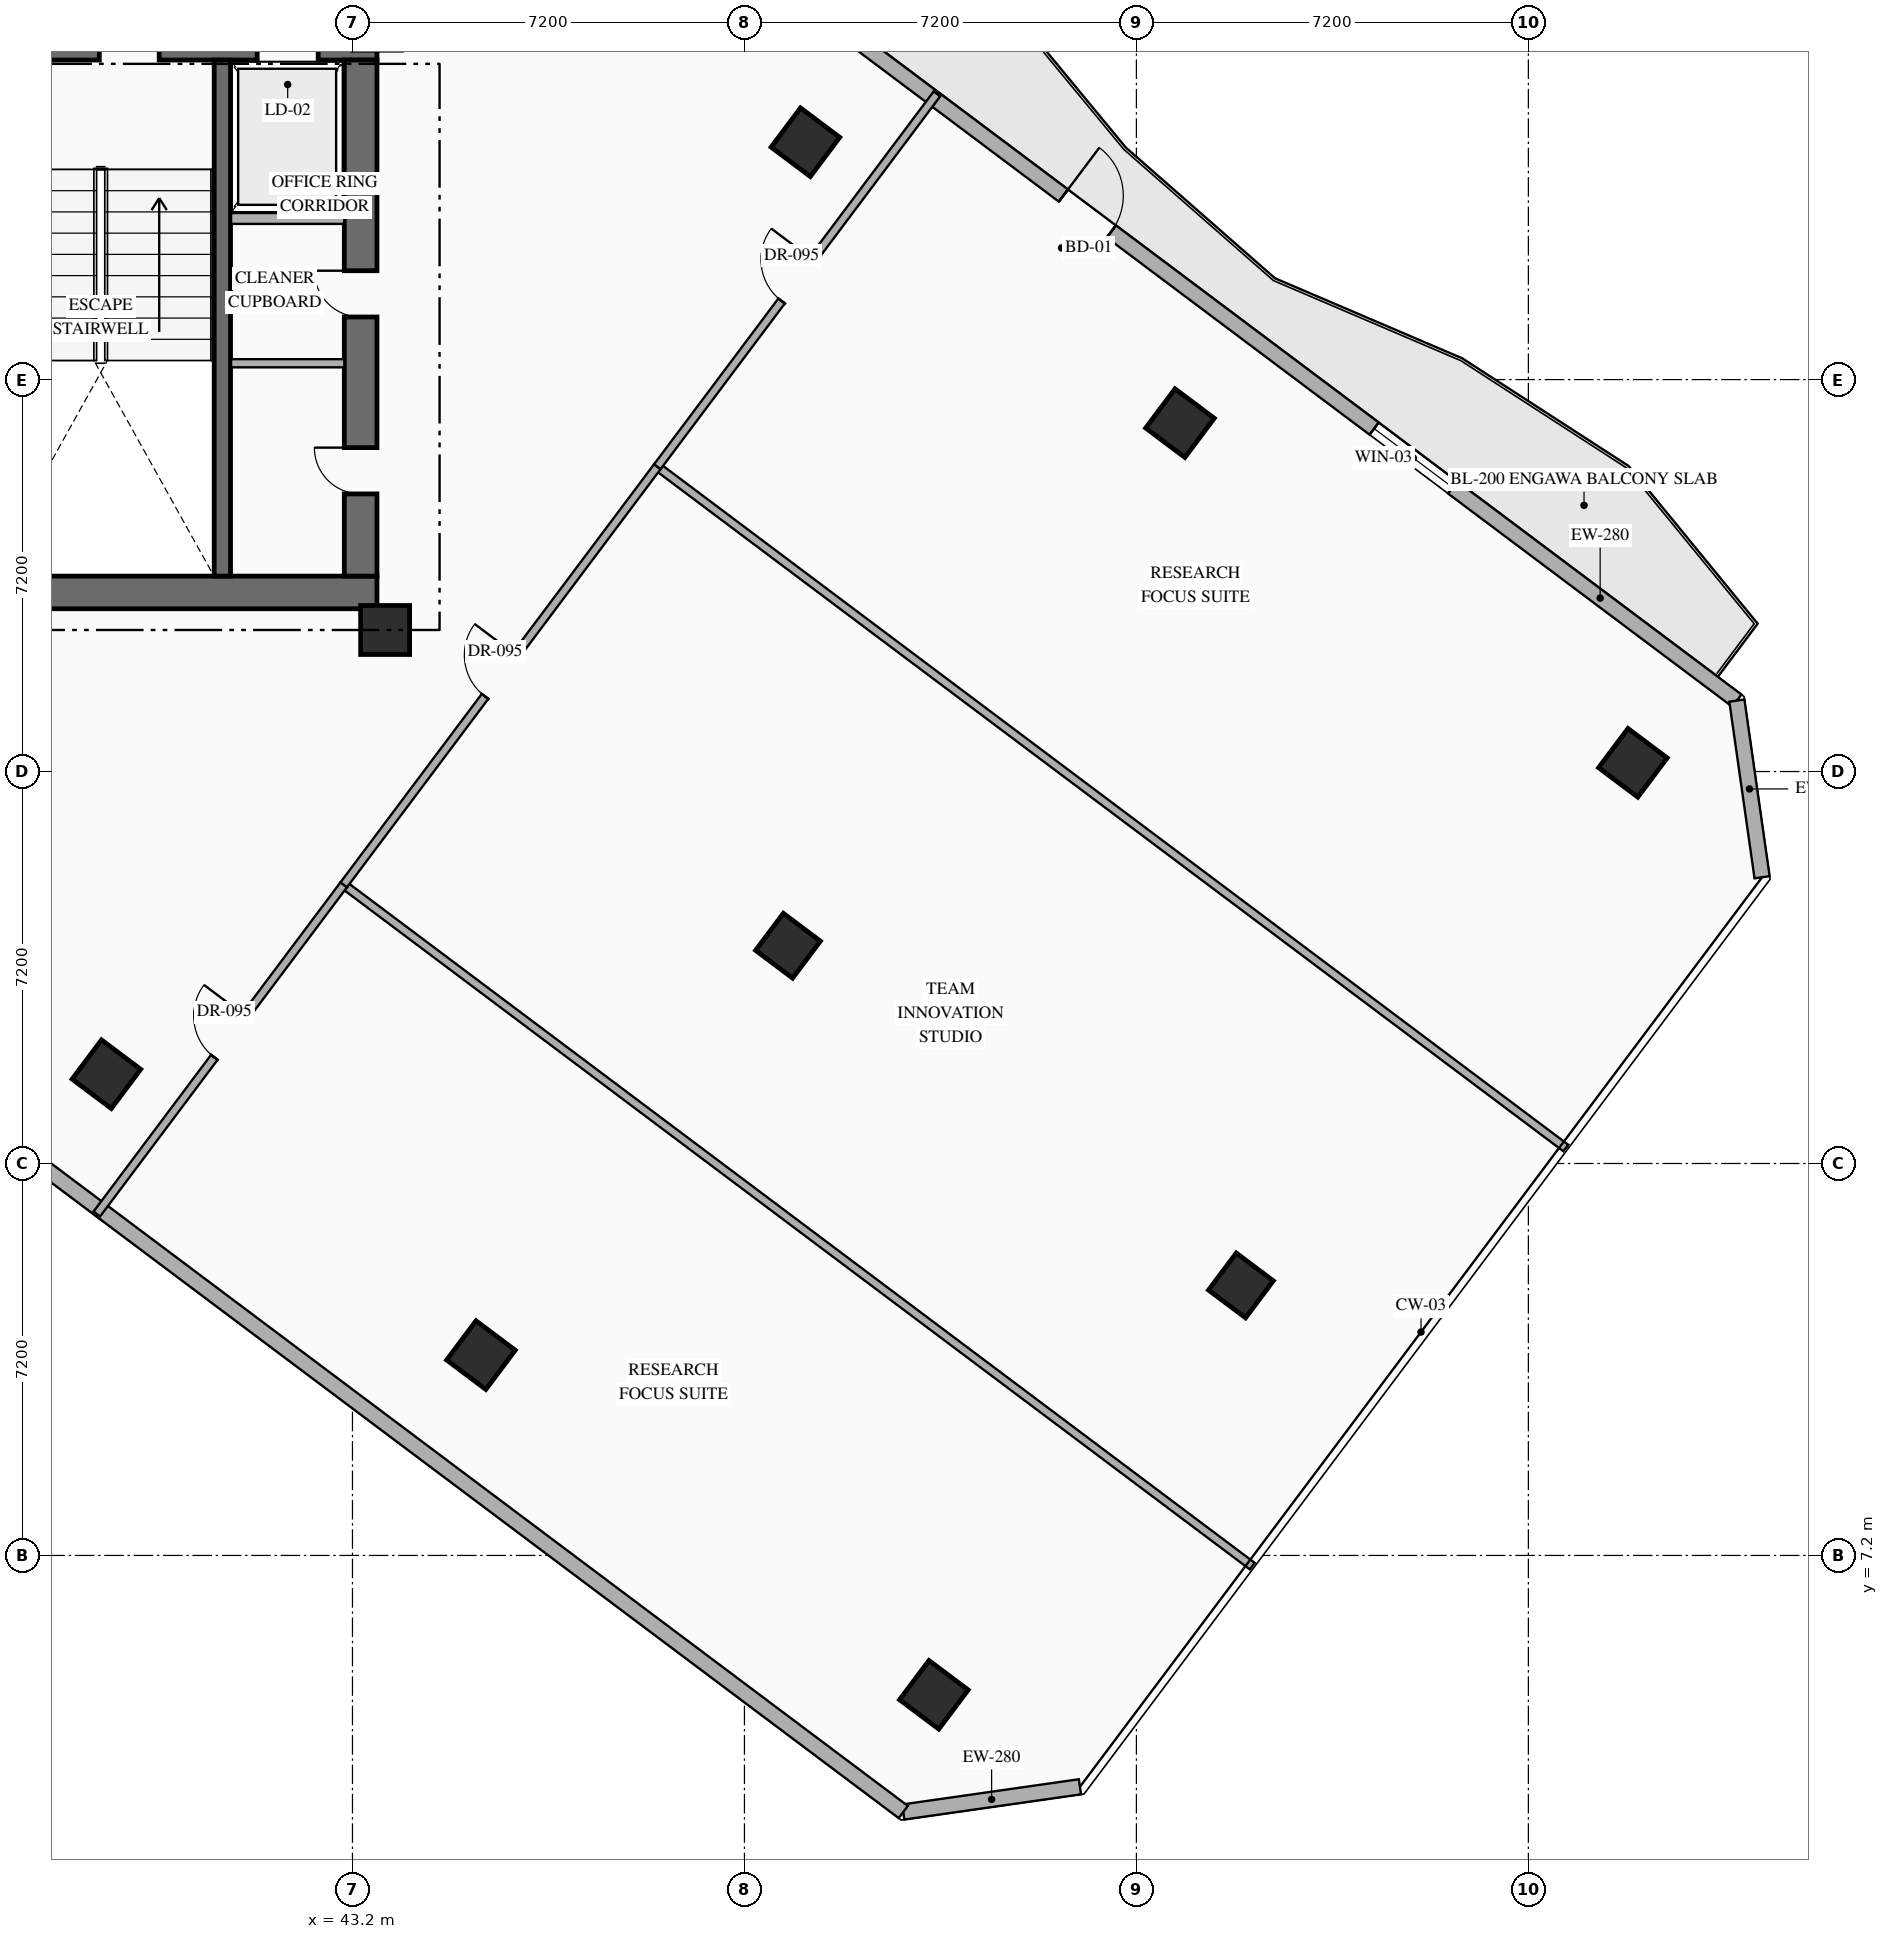
"""IFC4 building model, lengths in metres.
Left out: names, types, materials, properties, quantities, classifications, styles, units other than length and angle.
Written with IfcOpenShell. Run it as: python <this file> out.ifc"""

import sys

from ifc_helpers import new_model, si_unit, direction, frame, frame_2d, origin, origin_2d, place, context, subcontext, project, spatial, rectangle, hollow_rectangle, extrude, element, fill, save


model = new_model("IFC4")
c1 = context("Model", 3, precision=1e-05, world=origin(), true_north=direction((0.0, 1.0)))
c2 = subcontext(c1, "Body", "Model", "MODEL_VIEW")
j1 = project(units=[si_unit("LENGTHUNIT", "METRE"), si_unit("PLANEANGLEUNIT", "RADIAN")], contexts=[c1])
p1 = place(None, origin())
s1 = spatial("IfcSite", under=j1, at=p1, CompositionType="ELEMENT")
p2 = place(p1, origin())
s2 = spatial("IfcBuilding", under=s1, at=p2, CompositionType="ELEMENT")
p3 = place(p2, frame((0.0, 0.0, 108.45)))
s3 = spatial("IfcBuildingStorey", under=s2, at=p3, CompositionType="ELEMENT", Elevation=108.45)
p4 = place(p3, frame((35.89, 24.89, 0.0), z_axis=(0.0, 0.0, 1.0), x_axis=(1.0, 0.0, 0.0)))
e1 = element("IfcWall", 1, at=p4, inside=s3, PredefinedType="SHEAR", context=c2, shape_type="SweptSolid", body=[
    extrude(rectangle(XDim=7.76, YDim=0.6, at=frame_2d((3.88, 0.0))), origin(), (0.0, 0.0, 1.0), 3.6),
])
p5 = place(p3, frame((35.89, 34.97, 0.0), z_axis=(0.0, 0.0, 1.0), x_axis=(1.0, 0.0, 0.0)))
e2 = element("IfcWall", 2, at=p5, inside=s3, PredefinedType="SHEAR", context=c2, shape_type="SweptSolid", body=[
    extrude(rectangle(XDim=7.76, YDim=0.6, at=frame_2d((3.88, 0.0))), origin(), (0.0, 0.0, 1.0), 3.6),
])
p6 = place(p5, frame((2.66, 0.0, 0.0)))
e3 = element("IfcOpeningElement", 3, at=p6, cuts=e2, PredefinedType="OPENING", context=c2, shape_type="SweptSolid", body=[
    extrude(rectangle(XDim=1.1, YDim=2.2, at=frame_2d((0.55, 1.1))), frame((0.0, 0.31, 0.0), z_axis=(0.0, -1.0, 0.0), x_axis=(1.0, 0.0, 0.0)), (0.0, 0.0, 1.0), 0.62),
])
p7 = place(p5, frame((5.56, 0.0, 0.0)))
e4 = element("IfcOpeningElement", 4, at=p7, cuts=e2, PredefinedType="OPENING", context=c2, shape_type="SweptSolid", body=[
    extrude(rectangle(XDim=1.12, YDim=2.15, at=frame_2d((0.56, 1.075))), frame((0.0, 0.31, 0.0), z_axis=(0.0, -1.0, 0.0), x_axis=(1.0, 0.0, 0.0)), (0.0, 0.0, 1.0), 0.62),
])
p8 = place(p3, frame((43.35, 25.19, 0.0), z_axis=(0.0, 0.0, 1.0), x_axis=(0.0, 1.0, 0.0)))
e5 = element("IfcWall", 5, at=p8, inside=s3, PredefinedType="SHEAR", context=c2, shape_type="SweptSolid", body=[
    extrude(rectangle(XDim=9.48, YDim=0.6, at=frame_2d((4.74, 0.0))), origin(), (0.0, 0.0, 1.0), 3.6),
])
p9 = place(p8, frame((1.51, 0.0, 0.0)))
e6 = element("IfcOpeningElement", 6, at=p9, cuts=e5, PredefinedType="OPENING", context=c2, shape_type="SweptSolid", body=[
    extrude(rectangle(XDim=0.85, YDim=2.08, at=frame_2d((0.425, 1.04))), frame((0.0, 0.31, 0.0), z_axis=(0.0, -1.0, 0.0), x_axis=(1.0, 0.0, 0.0)), (0.0, 0.0, 1.0), 0.62),
])
p10 = place(p8, frame((4.76, 0.0, 0.0)))
e7 = element("IfcOpeningElement", 7, at=p10, cuts=e5, PredefinedType="OPENING", context=c2, shape_type="SweptSolid", body=[
    extrude(rectangle(XDim=0.85, YDim=2.08, at=frame_2d((0.425, 1.04))), frame((0.0, 0.31, 0.0), z_axis=(0.0, -1.0, 0.0), x_axis=(1.0, 0.0, 0.0)), (0.0, 0.0, 1.0), 0.62),
])
p11 = place(p3, frame((40.81, 25.19, 0.0), z_axis=(0.0, 0.0, 1.0), x_axis=(0.0, 1.0, 0.0)))
e8 = element("IfcWall", 8, at=p11, inside=s3, PredefinedType="SHEAR", context=c2, shape_type="SweptSolid", body=[
    extrude(rectangle(XDim=9.48, YDim=0.3, at=frame_2d((4.74, 0.0))), origin(), (0.0, 0.0, 1.0), 3.6),
])
p12 = place(p3, frame((43.8, 24.2, 0.0), z_axis=(0.0, 0.0, 1.0), x_axis=(1.0, 0.0, 0.0)))
e9 = element("IfcColumn", 9, at=p12, inside=s3, PredefinedType="COLUMN", context=c2, shape_type="SweptSolid", body=[
    extrude(rectangle(XDim=0.9, YDim=0.9, at=origin_2d()), origin(), (0.0, 0.0, 1.0), 3.6),
])
for number, where, z_axis, x_axis in (
    (10, (38.68, 16.04, 0.0), (0.0, 0.0, 1.0), (0.8, -0.6, 0.0)),
    (11, (51.52, 33.16, 0.0), (0.0, 0.0, 1.0), (0.8, -0.6, 0.0)),
    (12, (45.56, 10.88, 0.0), (0.0, 0.0, 1.0), (0.8, -0.6, 0.0)),
    (13, (58.4, 28.0, 0.0), (0.0, 0.0, 1.0), (0.8, -0.6, 0.0)),
):
    element("IfcColumn", number, at=place(p3, frame(where, z_axis=z_axis, x_axis=x_axis)), inside=s3, PredefinedType="COLUMN", context=c2, shape_type="SweptSolid", body=[
        extrude(hollow_rectangle(XDim=0.9, YDim=0.9, WallThickness=0.036, at=origin_2d()), origin(), (0.0, 0.0, 1.0), 3.6),
    ])
p13 = place(p3, frame((51.2, 18.4, 0.0), z_axis=(0.0, 0.0, 1.0), x_axis=(0.799999996291, -0.600000004945, 0.0)))
e14 = element("IfcColumn", 14, at=p13, inside=s3, PredefinedType="COLUMN", context=c2, shape_type="SweptSolid", body=[
    extrude(hollow_rectangle(XDim=0.85, YDim=0.85, WallThickness=0.032, at=origin_2d()), origin(), (0.0, 0.0, 1.0), 3.6),
])
for number, where, z_axis, x_axis in (
    (15, (53.88, 4.64, 0.0), (0.0, 0.0, 1.0), (0.8, -0.6, 0.0)),
    (16, (66.72, 21.76, 0.0), (0.0, 0.0, 1.0), (0.8, -0.6, 0.0)),
):
    element("IfcColumn", number, at=place(p3, frame(where, z_axis=z_axis, x_axis=x_axis)), inside=s3, PredefinedType="COLUMN", context=c2, shape_type="SweptSolid", body=[
        extrude(hollow_rectangle(XDim=0.9, YDim=0.9, WallThickness=0.036, at=origin_2d()), origin(), (0.0, 0.0, 1.0), 3.6),
    ])
p14 = place(p3, frame((59.52, 12.16, 0.0), z_axis=(0.0, 0.0, 1.0), x_axis=(0.799999996291, -0.600000004945, 0.0)))
e17 = element("IfcColumn", 17, at=p14, inside=s3, PredefinedType="COLUMN", context=c2, shape_type="SweptSolid", body=[
    extrude(hollow_rectangle(XDim=0.85, YDim=0.85, WallThickness=0.032, at=origin_2d()), origin(), (0.0, 0.0, 1.0), 3.6),
])
p15 = place(p3, frame((44.86, 40.73, 0.0), z_axis=(0.0, 0.0, 1.0), x_axis=(0.800006902154, -0.599990797017, 0.0)))
e18 = element("IfcWall", 18, at=p15, inside=s3, PredefinedType="STANDARD", context=c2, shape_type="SweptSolid", body=[
    extrude(rectangle(XDim=29.712, YDim=0.28, at=frame_2d((14.856, 0.0))), origin(), (0.0, 0.0, 1.0), 3.35),
])
p16 = place(p15, frame((14.249, 0.0, 0.0)))
e19 = element("IfcOpeningElement", 19, at=p16, cuts=e18, PredefinedType="OPENING", context=c2, shape_type="SweptSolid", body=[
    extrude(rectangle(XDim=1.1, YDim=2.2, at=frame_2d((0.55, 1.1))), frame((0.0, 0.15, 0.0), z_axis=(0.0, -1.0, 0.0), x_axis=(1.0, 0.0, 0.0)), (0.0, 0.0, 1.0), 0.3),
])
p17 = place(p15, frame((6.528, 0.0, 0.85)))
e20 = element("IfcOpeningElement", 20, at=p17, cuts=e18, PredefinedType="OPENING", context=c2, shape_type="SweptSolid", body=[
    extrude(rectangle(XDim=1.8, YDim=2.1, at=frame_2d((0.9, 1.05))), frame((0.0, 0.15, 0.0), z_axis=(0.0, -1.0, 0.0), x_axis=(1.0, 0.0, 0.0)), (0.0, 0.0, 1.0), 0.3),
])
p18 = place(p15, frame((21.384, 0.0, 0.85)))
e21 = element("IfcOpeningElement", 21, at=p18, cuts=e18, PredefinedType="OPENING", context=c2, shape_type="SweptSolid", body=[
    extrude(rectangle(XDim=1.8, YDim=2.1, at=frame_2d((0.9, 1.05))), frame((0.0, 0.15, 0.0), z_axis=(0.0, -1.0, 0.0), x_axis=(1.0, 0.0, 0.0)), (0.0, 0.0, 1.0), 0.3),
])
p19 = place(p3, frame((68.63, 22.903, 0.0), z_axis=(0.0, 0.0, 1.0), x_axis=(0.141285803956, -0.989968848803, 0.0)))
e22 = element("IfcWall", 22, at=p19, inside=s3, PredefinedType="STANDARD", context=c2, shape_type="SweptSolid", body=[
    extrude(rectangle(XDim=3.278, YDim=0.28, at=frame_2d((1.639, 0.0))), origin(), (0.0, 0.0, 1.0), 3.35),
])
p20 = place(p3, frame((56.563, 2.95, 0.0), z_axis=(0.0, 0.0, 1.0), x_axis=(-0.989977778067, -0.141223223777, 0.0)))
e23 = element("IfcWall", 23, at=p20, inside=s3, PredefinedType="STANDARD", context=c2, shape_type="SweptSolid", body=[
    extrude(rectangle(XDim=3.278, YDim=0.28, at=frame_2d((1.639, 0.0))), origin(), (0.0, 0.0, 1.0), 3.35),
])
p21 = place(p3, frame((53.318, 2.487, 0.0), z_axis=(0.0, 0.0, 1.0), x_axis=(-0.800004174678, 0.599994433723, 0.0)))
e24 = element("IfcWall", 24, at=p21, inside=s3, PredefinedType="STANDARD", context=c2, shape_type="SweptSolid", body=[
    extrude(rectangle(XDim=35.089, YDim=0.28, at=frame_2d((17.544, 0.0))), origin(), (0.0, 0.0, 1.0), 3.35),
])
p22 = place(p3, frame((40.97, 31.76, 0.0), z_axis=(0.0, 0.0, 1.0), x_axis=(1.0, 0.0, 0.0)))
e25 = element("IfcWall", 25, at=p22, inside=s3, PredefinedType="STANDARD", context=c2, shape_type="SweptSolid", body=[
    extrude(rectangle(XDim=2.08, YDim=0.2, at=frame_2d((1.04, 0.0))), origin(), (0.0, 0.0, 1.0), 3.35),
])
p23 = place(p3, frame((40.97, 29.1, 0.0), z_axis=(0.0, 0.0, 1.0), x_axis=(1.0, 0.0, 0.0)))
e26 = element("IfcWall", 26, at=p23, inside=s3, PredefinedType="PARTITIONING", context=c2, shape_type="SweptSolid", body=[
    extrude(rectangle(XDim=2.08, YDim=0.15, at=frame_2d((1.04, 0.0))), origin(), (0.0, 0.0, 1.0), 3.35),
])
p24 = place(p3, frame((43.04, 19.52, 0.0), z_axis=(0.0, 0.0, 1.0), x_axis=(0.799997191095, -0.600003745189, 0.0)))
e27 = element("IfcWall", 27, at=p24, inside=s3, PredefinedType="PARTITIONING", context=c2, shape_type="SweptSolid", body=[
    extrude(rectangle(XDim=20.86, YDim=0.15, at=frame_2d((10.43, 0.0))), origin(), (0.0, 0.0, 1.0), 3.35),
])
p25 = place(p3, frame((38.504, 13.472, 0.0), z_axis=(0.0, 0.0, 1.0), x_axis=(0.600005166878, 0.799996124815, 0.0)))
e28 = element("IfcWall", 28, at=p25, inside=s3, PredefinedType="PARTITIONING", context=c2, shape_type="SweptSolid", body=[
    extrude(rectangle(XDim=7.56, YDim=0.15, at=frame_2d((3.78, 0.0))), origin(), (0.0, 0.0, 1.0), 3.35),
])
p26 = place(p25, frame((3.598, 0.0, 0.0)))
e29 = element("IfcOpeningElement", 29, at=p26, cuts=e28, PredefinedType="OPENING", context=c2, shape_type="SweptSolid", body=[
    extrude(rectangle(XDim=0.95, YDim=2.15, at=frame_2d((0.475, 1.075))), frame((0.0, 0.085, 0.0), z_axis=(0.0, -1.0, 0.0), x_axis=(1.0, 0.0, 0.0)), (0.0, 0.0, 1.0), 0.17),
])
p27 = place(p3, frame((48.8, 27.2, 0.0), z_axis=(0.0, 0.0, 1.0), x_axis=(0.800002808908, -0.599996254772, 0.0)))
e30 = element("IfcWall", 30, at=p27, inside=s3, PredefinedType="PARTITIONING", context=c2, shape_type="SweptSolid", body=[
    extrude(rectangle(XDim=20.86, YDim=0.15, at=frame_2d((10.43, 0.0))), origin(), (0.0, 0.0, 1.0), 3.35),
])
p28 = place(p3, frame((43.04, 19.52, 0.0), z_axis=(0.0, 0.0, 1.0), x_axis=(0.600004069023, 0.799996948216, 0.0)))
e31 = element("IfcWall", 31, at=p28, inside=s3, PredefinedType="PARTITIONING", context=c2, shape_type="SweptSolid", body=[
    extrude(rectangle(XDim=9.6, YDim=0.15, at=frame_2d((4.8, 0.0))), origin(), (0.0, 0.0, 1.0), 3.35),
])
p29 = place(p28, frame((4.325, 0.0, 0.0)))
e32 = element("IfcOpeningElement", 32, at=p29, cuts=e31, PredefinedType="OPENING", context=c2, shape_type="SweptSolid", body=[
    extrude(rectangle(XDim=0.95, YDim=2.15, at=frame_2d((0.475, 1.075))), frame((0.0, 0.085, 0.0), z_axis=(0.0, -1.0, 0.0), x_axis=(1.0, 0.0, 0.0)), (0.0, 0.0, 1.0), 0.17),
])
p30 = place(p3, frame((48.8, 27.2, 0.0), z_axis=(0.0, 0.0, 1.0), x_axis=(0.599990873323, 0.800006844926, 0.0)))
e33 = element("IfcWall", 33, at=p30, inside=s3, PredefinedType="PARTITIONING", context=c2, shape_type="SweptSolid", body=[
    extrude(rectangle(XDim=8.56, YDim=0.15, at=frame_2d((4.28, 0.0))), origin(), (0.0, 0.0, 1.0), 3.35),
])
p31 = place(p30, frame((3.805, 0.0, 0.0)))
e34 = element("IfcOpeningElement", 34, at=p31, cuts=e33, PredefinedType="OPENING", context=c2, shape_type="SweptSolid", body=[
    extrude(rectangle(XDim=0.95, YDim=2.15, at=frame_2d((0.475, 1.075))), frame((0.0, 0.085, 0.0), z_axis=(0.0, -1.0, 0.0), x_axis=(1.0, 0.0, 0.0)), (0.0, 0.0, 1.0), 0.17),
])
p32 = place(p16, origin())
e35 = element("IfcDoor", 35, at=p32, inside=s3, OperationType="SINGLE_SWING_LEFT", PredefinedType="DOOR", context=c2, shape_type="SweptSolid", body=[
    extrude(rectangle(XDim=1.1, YDim=2.2, at=frame_2d((0.55, 1.1))), frame((0.0, 0.025, 0.0), z_axis=(0.0, -1.0, 0.0), x_axis=(1.0, 0.0, 0.0)), (0.0, 0.0, 1.0), 0.05),
])
fill(e19, e35)
p33 = place(p18, origin())
e36 = element("IfcWindow", 36, at=p33, inside=s3, PartitioningType="SINGLE_PANEL", PredefinedType="WINDOW", context=c2, shape_type="SweptSolid", body=[
    extrude(rectangle(XDim=1.8, YDim=2.1, at=frame_2d((0.9, 1.05))), frame((0.0, 0.03, 0.0), z_axis=(0.0, -1.0, 0.0), x_axis=(1.0, 0.0, 0.0)), (0.0, 0.0, 1.0), 0.06),
])
fill(e21, e36)
p34 = place(p9, origin())
e37 = element("IfcDoor", 37, at=p34, inside=s3, OperationType="SINGLE_SWING_RIGHT", PredefinedType="DOOR", context=c2, shape_type="SweptSolid", body=[
    extrude(rectangle(XDim=0.85, YDim=2.08, at=frame_2d((0.425, 1.04))), frame((0.0, 0.025, 0.0), z_axis=(0.0, -1.0, 0.0), x_axis=(1.0, 0.0, 0.0)), (0.0, 0.0, 1.0), 0.05),
])
fill(e6, e37)
p35 = place(p10, origin())
e38 = element("IfcDoor", 38, at=p35, inside=s3, OperationType="SINGLE_SWING_RIGHT", PredefinedType="DOOR", context=c2, shape_type="SweptSolid", body=[
    extrude(rectangle(XDim=0.85, YDim=2.08, at=frame_2d((0.425, 1.04))), frame((0.0, 0.025, 0.0), z_axis=(0.0, -1.0, 0.0), x_axis=(1.0, 0.0, 0.0)), (0.0, 0.0, 1.0), 0.05),
])
fill(e7, e38)
p36 = place(p26, origin())
e39 = element("IfcDoor", 39, at=p36, inside=s3, OperationType="SINGLE_SWING_RIGHT", PredefinedType="DOOR", context=c2, shape_type="SweptSolid", body=[
    extrude(rectangle(XDim=0.95, YDim=2.15, at=frame_2d((0.475, 1.075))), frame((0.0, 0.025, 0.0), z_axis=(0.0, -1.0, 0.0), x_axis=(1.0, 0.0, 0.0)), (0.0, 0.0, 1.0), 0.05),
])
fill(e29, e39)
p37 = place(p29, origin())
e40 = element("IfcDoor", 40, at=p37, inside=s3, OperationType="SINGLE_SWING_RIGHT", PredefinedType="DOOR", context=c2, shape_type="SweptSolid", body=[
    extrude(rectangle(XDim=0.95, YDim=2.15, at=frame_2d((0.475, 1.075))), frame((0.0, 0.025, 0.0), z_axis=(0.0, -1.0, 0.0), x_axis=(1.0, 0.0, 0.0)), (0.0, 0.0, 1.0), 0.05),
])
fill(e32, e40)
p38 = place(p31, origin())
e41 = element("IfcDoor", 41, at=p38, inside=s3, OperationType="SINGLE_SWING_RIGHT", PredefinedType="DOOR", context=c2, shape_type="SweptSolid", body=[
    extrude(rectangle(XDim=0.95, YDim=2.15, at=frame_2d((0.475, 1.075))), frame((0.0, 0.025, 0.0), z_axis=(0.0, -1.0, 0.0), x_axis=(1.0, 0.0, 0.0)), (0.0, 0.0, 1.0), 0.05),
])
fill(e34, e41)
save(model, sys.argv[1])
